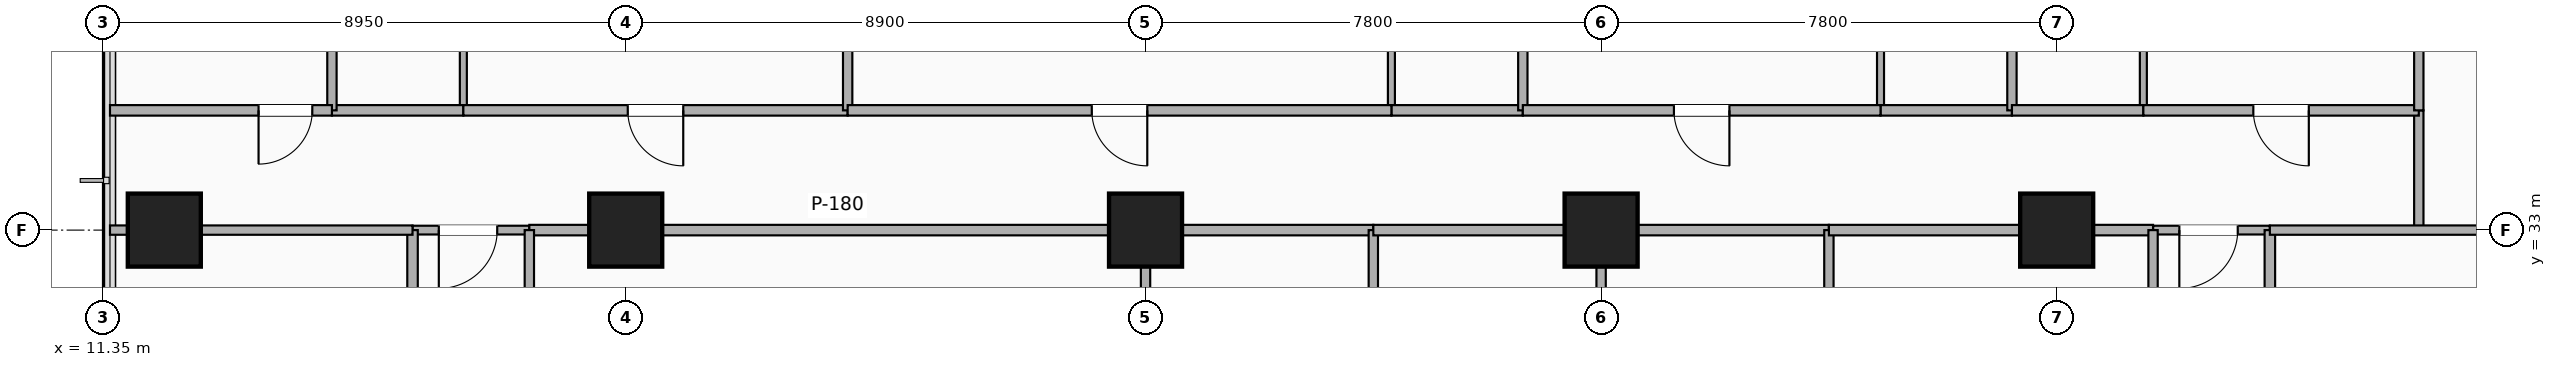
"""IFC4 building model, lengths in metres.
Left out: names, types, materials, properties, quantities, classifications, styles, units other than length and angle.
Written with IfcOpenShell. Run it as: python <this file> out.ifc"""

import sys

from ifc_helpers import new_model, si_unit, direction, frame, frame_2d, origin, origin_2d, place, context, subcontext, project, spatial, rectangle, extrude, element, fill, save


model = new_model("IFC4")
c1 = context("Model", 3, precision=1e-05, world=origin(), true_north=direction((0.0, 1.0)))
c2 = subcontext(c1, "Body", "Model", "MODEL_VIEW")
j1 = project(units=[si_unit("LENGTHUNIT", "METRE"), si_unit("PLANEANGLEUNIT", "RADIAN")], contexts=[c1])
p1 = place(None, origin())
s1 = spatial("IfcSite", under=j1, at=p1, CompositionType="ELEMENT")
p2 = place(p1, origin())
s2 = spatial("IfcBuilding", under=s1, at=p2, CompositionType="ELEMENT")
p3 = place(p2, frame((0.0, 0.0, 91.7)))
s3 = spatial("IfcBuildingStorey", under=s2, at=p3, CompositionType="ELEMENT", Elevation=91.7)
for number, where, z_axis, x_axis in (
    (1, (20.3, 33.0, -0.26), (0.0, 0.0, 1.0), (1.0, 0.0, 0.0)),
    (2, (29.2, 33.0, -0.26), (0.0, 0.0, 1.0), (1.0, 0.0, 0.0)),
    (3, (37.0, 33.0, -0.26), (0.0, 0.0, 1.0), (1.0, 0.0, 0.0)),
    (4, (44.8, 33.0, -0.26), (0.0, 0.0, 1.0), (1.0, 0.0, 0.0)),
    (5, (12.4, 33.0, -0.26), (0.0, 0.0, 1.0), (1.0, 0.0, 0.0)),
):
    element("IfcColumn", number, at=place(p3, frame(where, z_axis=z_axis, x_axis=x_axis)), inside=s3, PredefinedType="COLUMN", context=c2, shape_type="SweptSolid", body=[
        extrude(rectangle(XDim=1.25, YDim=1.25, at=origin_2d()), origin(), (0.0, 0.0, 1.0), 3.5),
    ])
p4 = place(p3, frame((16.65, 33.0, 0.0), z_axis=(0.0, 0.0, 1.0), x_axis=(1.0, 0.0, 0.0)))
e6 = element("IfcWall", 6, at=p4, inside=s3, PredefinedType="PARTITIONING", context=c2, shape_type="SweptSolid", body=[
    extrude(rectangle(XDim=2.0, YDim=0.15, at=frame_2d((1.0, 0.0))), origin(), (0.0, 0.0, 1.0), 2.313),
])
p5 = place(p4, frame((0.45, 0.0, 0.0)))
e7 = element("IfcOpeningElement", 7, at=p5, cuts=e6, PredefinedType="OPENING", context=c2, shape_type="SweptSolid", body=[
    extrude(rectangle(XDim=1.0, YDim=2.15, at=frame_2d((0.5, 1.075))), frame((0.0, 0.085, 0.0), z_axis=(0.0, -1.0, 0.0), x_axis=(1.0, 0.0, 0.0)), (0.0, 0.0, 1.0), 0.17),
])
p6 = place(p3, frame((46.45, 33.0, 0.0), z_axis=(0.0, 0.0, 1.0), x_axis=(1.0, 0.0, 0.0)))
e8 = element("IfcWall", 8, at=p6, inside=s3, PredefinedType="PARTITIONING", context=c2, shape_type="SweptSolid", body=[
    extrude(rectangle(XDim=2.0, YDim=0.15, at=frame_2d((1.0, 0.0))), origin(), (0.0, 0.0, 1.0), 2.313),
])
p7 = place(p6, frame((0.45, 0.0, 0.0)))
e9 = element("IfcOpeningElement", 9, at=p7, cuts=e8, PredefinedType="OPENING", context=c2, shape_type="SweptSolid", body=[
    extrude(rectangle(XDim=1.0, YDim=2.15, at=frame_2d((0.5, 1.075))), frame((0.0, 0.085, 0.0), z_axis=(0.0, -1.0, 0.0), x_axis=(1.0, 0.0, 0.0)), (0.0, 0.0, 1.0), 0.17),
])
p8 = place(p3, frame((51.0, 33.0, 0.0), z_axis=(0.0, 0.0, 1.0), x_axis=(0.0, 1.0, 0.0)))
e10 = element("IfcWall", 10, at=p8, inside=s3, PredefinedType="PARTITIONING", context=c2, shape_type="SweptSolid", body=[
    extrude(rectangle(XDim=2.05, YDim=0.16, at=frame_2d((1.025, 0.0))), origin(), (0.0, 0.0, 1.0), 2.313),
])
p9 = place(p3, frame((18.65, 33.0, 0.0), z_axis=(0.0, 0.0, 1.0), x_axis=(1.0, 0.0, 0.0)))
e11 = element("IfcWall", 11, at=p9, inside=s3, PredefinedType="PARTITIONING", context=c2, shape_type="SweptSolid", body=[
    extrude(rectangle(XDim=10.55, YDim=0.18, at=frame_2d((5.275, 0.0))), origin(), (0.0, 0.0, 1.0), 2.313),
])
for number, where, z_axis, x_axis in (
    (12, (18.65, 22.65, 0.0), (0.0, 0.0, 1.0), (0.0, 1.0, 0.0)),
    (13, (29.2, 22.65, 0.0), (0.0, 0.0, 1.0), (0.0, 1.0, 0.0)),
):
    element("IfcWall", number, at=place(p3, frame(where, z_axis=z_axis, x_axis=x_axis)), inside=s3, PredefinedType="PARTITIONING", context=c2, shape_type="SweptSolid", body=[
        extrude(rectangle(XDim=10.35, YDim=0.16, at=frame_2d((5.175, 0.0))), origin(), (0.0, 0.0, 1.0), 2.313),
    ])
p10 = place(p3, frame((29.2, 33.0, 0.0), z_axis=(0.0, 0.0, 1.0), x_axis=(1.0, 0.0, 0.0)))
e14 = element("IfcWall", 14, at=p10, inside=s3, PredefinedType="PARTITIONING", context=c2, shape_type="SweptSolid", body=[
    extrude(rectangle(XDim=3.9, YDim=0.18, at=frame_2d((1.95, 0.0))), origin(), (0.0, 0.0, 1.0), 2.313),
])
p11 = place(p3, frame((33.1, 22.65, 0.0), z_axis=(0.0, 0.0, 1.0), x_axis=(0.0, 1.0, 0.0)))
e15 = element("IfcWall", 15, at=p11, inside=s3, PredefinedType="PARTITIONING", context=c2, shape_type="SweptSolid", body=[
    extrude(rectangle(XDim=10.35, YDim=0.16, at=frame_2d((5.175, 0.0))), origin(), (0.0, 0.0, 1.0), 2.614),
])
p12 = place(p3, frame((33.1, 33.0, 0.0), z_axis=(0.0, 0.0, 1.0), x_axis=(1.0, 0.0, 0.0)))
e16 = element("IfcWall", 16, at=p12, inside=s3, PredefinedType="PARTITIONING", context=c2, shape_type="SweptSolid", body=[
    extrude(rectangle(XDim=3.9, YDim=0.18, at=frame_2d((1.95, 0.0))), origin(), (0.0, 0.0, 1.0), 2.313),
])
p13 = place(p3, frame((37.0, 22.65, 0.0), z_axis=(0.0, 0.0, 1.0), x_axis=(0.0, 1.0, 0.0)))
e17 = element("IfcWall", 17, at=p13, inside=s3, PredefinedType="PARTITIONING", context=c2, shape_type="SweptSolid", body=[
    extrude(rectangle(XDim=10.35, YDim=0.16, at=frame_2d((5.175, 0.0))), origin(), (0.0, 0.0, 1.0), 2.313),
])
p14 = place(p3, frame((37.0, 33.0, 0.0), z_axis=(0.0, 0.0, 1.0), x_axis=(1.0, 0.0, 0.0)))
e18 = element("IfcWall", 18, at=p14, inside=s3, PredefinedType="PARTITIONING", context=c2, shape_type="SweptSolid", body=[
    extrude(rectangle(XDim=3.9, YDim=0.18, at=frame_2d((1.95, 0.0))), origin(), (0.0, 0.0, 1.0), 2.313),
])
p15 = place(p3, frame((40.9, 22.65, 0.0), z_axis=(0.0, 0.0, 1.0), x_axis=(0.0, 1.0, 0.0)))
e19 = element("IfcWall", 19, at=p15, inside=s3, PredefinedType="PARTITIONING", context=c2, shape_type="SweptSolid", body=[
    extrude(rectangle(XDim=10.35, YDim=0.16, at=frame_2d((5.175, 0.0))), origin(), (0.0, 0.0, 1.0), 2.614),
])
p16 = place(p3, frame((40.9, 33.0, 0.0), z_axis=(0.0, 0.0, 1.0), x_axis=(1.0, 0.0, 0.0)))
e20 = element("IfcWall", 20, at=p16, inside=s3, PredefinedType="PARTITIONING", context=c2, shape_type="SweptSolid", body=[
    extrude(rectangle(XDim=5.55, YDim=0.18, at=frame_2d((2.775, 0.0))), origin(), (0.0, 0.0, 1.0), 2.313),
])
p17 = place(p3, frame((46.45, 22.65, 0.0), z_axis=(0.0, 0.0, 1.0), x_axis=(0.0, 1.0, 0.0)))
e21 = element("IfcWall", 21, at=p17, inside=s3, PredefinedType="PARTITIONING", context=c2, shape_type="SweptSolid", body=[
    extrude(rectangle(XDim=10.35, YDim=0.16, at=frame_2d((5.175, 0.0))), origin(), (0.0, 0.0, 1.0), 2.313),
])
p18 = place(p3, frame((17.52, 35.05, 0.0), z_axis=(0.0, 0.0, 1.0), x_axis=(0.0, 1.0, 0.0)))
e22 = element("IfcWall", 22, at=p18, inside=s3, PredefinedType="PARTITIONING", context=c2, shape_type="SweptSolid", body=[
    extrude(rectangle(XDim=2.35, YDim=0.12, at=frame_2d((1.175, 0.0))), origin(), (0.0, 0.0, 1.0), 3.24),
])
p19 = place(p3, frame((15.27, 35.05, 0.0), z_axis=(0.0, 0.0, 1.0), x_axis=(1.0, 0.0, 0.0)))
e23 = element("IfcWall", 23, at=p19, inside=s3, PredefinedType="PARTITIONING", context=c2, shape_type="SweptSolid", body=[
    extrude(rectangle(XDim=2.25, YDim=0.18, at=frame_2d((1.125, 0.0))), origin(), (0.0, 0.0, 1.0), 3.24),
])
p20 = place(p3, frame((17.52, 35.05, 0.0), z_axis=(0.0, 0.0, 1.0), x_axis=(1.0, 0.0, 0.0)))
e24 = element("IfcWall", 24, at=p20, inside=s3, PredefinedType="PARTITIONING", context=c2, shape_type="SweptSolid", body=[
    extrude(rectangle(XDim=6.58, YDim=0.18, at=frame_2d((3.29, 0.0))), origin(), (0.0, 0.0, 1.0), 2.313),
])
p21 = place(p20, frame((2.815, 0.0, 0.0)))
e25 = element("IfcOpeningElement", 25, at=p21, cuts=e24, PredefinedType="OPENING", context=c2, shape_type="SweptSolid", body=[
    extrude(rectangle(XDim=0.95, YDim=2.15, at=frame_2d((0.475, 1.075))), frame((0.0, 0.1, 0.0), z_axis=(0.0, -1.0, 0.0), x_axis=(1.0, 0.0, 0.0)), (0.0, 0.0, 1.0), 0.2),
])
p22 = place(p3, frame((15.27, 35.05, 0.0), z_axis=(0.0, 0.0, 1.0), x_axis=(0.0, 1.0, 0.0)))
e26 = element("IfcWall", 26, at=p22, inside=s3, PredefinedType="PARTITIONING", context=c2, shape_type="SweptSolid", body=[
    extrude(rectangle(XDim=7.53, YDim=0.16, at=frame_2d((3.765, 0.0))), origin(), (0.0, 0.0, 1.0), 3.24),
])
p23 = place(p3, frame((24.1, 35.05, 0.0), z_axis=(0.0, 0.0, 1.0), x_axis=(0.0, 1.0, 0.0)))
e27 = element("IfcWall", 27, at=p23, inside=s3, PredefinedType="PARTITIONING", context=c2, shape_type="SweptSolid", body=[
    extrude(rectangle(XDim=11.33, YDim=0.16, at=frame_2d((5.665, 0.0))), origin(), (0.0, 0.0, 1.0), 2.603),
])
p24 = place(p3, frame((33.41, 35.05, 0.0), z_axis=(0.0, 0.0, 1.0), x_axis=(0.0, 1.0, 0.0)))
e28 = element("IfcWall", 28, at=p24, inside=s3, PredefinedType="PARTITIONING", context=c2, shape_type="SweptSolid", body=[
    extrude(rectangle(XDim=2.35, YDim=0.12, at=frame_2d((1.175, 0.0))), origin(), (0.0, 0.0, 1.0), 2.922),
])
p25 = place(p3, frame((33.41, 35.05, 0.0), z_axis=(0.0, 0.0, 1.0), x_axis=(1.0, 0.0, 0.0)))
e29 = element("IfcWall", 29, at=p25, inside=s3, PredefinedType="PARTITIONING", context=c2, shape_type="SweptSolid", body=[
    extrude(rectangle(XDim=2.25, YDim=0.18, at=frame_2d((1.125, 0.0))), origin(), (0.0, 0.0, 1.0), 3.24),
])
p26 = place(p3, frame((24.1, 35.05, 0.0), z_axis=(0.0, 0.0, 1.0), x_axis=(1.0, 0.0, 0.0)))
e30 = element("IfcWall", 30, at=p26, inside=s3, PredefinedType="PARTITIONING", context=c2, shape_type="SweptSolid", body=[
    extrude(rectangle(XDim=9.31, YDim=0.18, at=frame_2d((4.655, 0.0))), origin(), (0.0, 0.0, 1.0), 2.313),
])
p27 = place(p26, frame((4.18, 0.0, 0.0)))
e31 = element("IfcOpeningElement", 31, at=p27, cuts=e30, PredefinedType="OPENING", context=c2, shape_type="SweptSolid", body=[
    extrude(rectangle(XDim=0.95, YDim=2.15, at=frame_2d((0.475, 1.075))), frame((0.0, 0.1, 0.0), z_axis=(0.0, -1.0, 0.0), x_axis=(1.0, 0.0, 0.0)), (0.0, 0.0, 1.0), 0.2),
])
p28 = place(p3, frame((35.66, 35.05, 0.0), z_axis=(0.0, 0.0, 1.0), x_axis=(0.0, 1.0, 0.0)))
e32 = element("IfcWall", 32, at=p28, inside=s3, PredefinedType="PARTITIONING", context=c2, shape_type="SweptSolid", body=[
    extrude(rectangle(XDim=11.33, YDim=0.16, at=frame_2d((5.665, 0.0))), origin(), (0.0, 0.0, 1.0), 2.603),
])
p29 = place(p3, frame((41.784, 35.05, 0.0), z_axis=(0.0, 0.0, 1.0), x_axis=(0.0, 1.0, 0.0)))
e33 = element("IfcWall", 33, at=p29, inside=s3, PredefinedType="PARTITIONING", context=c2, shape_type="SweptSolid", body=[
    extrude(rectangle(XDim=2.35, YDim=0.12, at=frame_2d((1.175, 0.0))), origin(), (0.0, 0.0, 1.0), 2.922),
])
p30 = place(p3, frame((41.784, 35.05, 0.0), z_axis=(0.0, 0.0, 1.0), x_axis=(1.0, 0.0, 0.0)))
e34 = element("IfcWall", 34, at=p30, inside=s3, PredefinedType="PARTITIONING", context=c2, shape_type="SweptSolid", body=[
    extrude(rectangle(XDim=2.25, YDim=0.18, at=frame_2d((1.125, 0.0))), origin(), (0.0, 0.0, 1.0), 3.24),
])
p31 = place(p3, frame((35.66, 35.05, 0.0), z_axis=(0.0, 0.0, 1.0), x_axis=(1.0, 0.0, 0.0)))
e35 = element("IfcWall", 35, at=p31, inside=s3, PredefinedType="PARTITIONING", context=c2, shape_type="SweptSolid", body=[
    extrude(rectangle(XDim=6.124, YDim=0.18, at=frame_2d((3.062, 0.0))), origin(), (0.0, 0.0, 1.0), 2.313),
])
p32 = place(p31, frame((2.587, 0.0, 0.0)))
e36 = element("IfcOpeningElement", 36, at=p32, cuts=e35, PredefinedType="OPENING", context=c2, shape_type="SweptSolid", body=[
    extrude(rectangle(XDim=0.95, YDim=2.15, at=frame_2d((0.475, 1.075))), frame((0.0, 0.1, 0.0), z_axis=(0.0, -1.0, 0.0), x_axis=(1.0, 0.0, 0.0)), (0.0, 0.0, 1.0), 0.2),
])
p33 = place(p3, frame((44.034, 35.05, 0.0), z_axis=(0.0, 0.0, 1.0), x_axis=(0.0, 1.0, 0.0)))
e37 = element("IfcWall", 37, at=p33, inside=s3, PredefinedType="PARTITIONING", context=c2, shape_type="SweptSolid", body=[
    extrude(rectangle(XDim=11.33, YDim=0.16, at=frame_2d((5.665, 0.0))), origin(), (0.0, 0.0, 1.0), 2.603),
])
p34 = place(p3, frame((46.284, 35.05, 0.0), z_axis=(0.0, 0.0, 1.0), x_axis=(0.0, 1.0, 0.0)))
e38 = element("IfcWall", 38, at=p34, inside=s3, PredefinedType="PARTITIONING", context=c2, shape_type="SweptSolid", body=[
    extrude(rectangle(XDim=2.35, YDim=0.12, at=frame_2d((1.175, 0.0))), origin(), (0.0, 0.0, 1.0), 3.24),
])
p35 = place(p3, frame((44.034, 35.05, 0.0), z_axis=(0.0, 0.0, 1.0), x_axis=(1.0, 0.0, 0.0)))
e39 = element("IfcWall", 39, at=p35, inside=s3, PredefinedType="PARTITIONING", context=c2, shape_type="SweptSolid", body=[
    extrude(rectangle(XDim=2.25, YDim=0.18, at=frame_2d((1.125, 0.0))), origin(), (0.0, 0.0, 1.0), 2.313),
])
p36 = place(p3, frame((46.284, 35.05, 0.0), z_axis=(0.0, 0.0, 1.0), x_axis=(1.0, 0.0, 0.0)))
e40 = element("IfcWall", 40, at=p36, inside=s3, PredefinedType="PARTITIONING", context=c2, shape_type="SweptSolid", body=[
    extrude(rectangle(XDim=4.716, YDim=0.18, at=frame_2d((2.358, 0.0))), origin(), (0.0, 0.0, 1.0), 3.24),
])
p37 = place(p36, frame((1.883, 0.0, 0.0)))
e41 = element("IfcOpeningElement", 41, at=p37, cuts=e40, PredefinedType="OPENING", context=c2, shape_type="SweptSolid", body=[
    extrude(rectangle(XDim=0.95, YDim=2.15, at=frame_2d((0.475, 1.075))), frame((0.0, 0.1, 0.0), z_axis=(0.0, -1.0, 0.0), x_axis=(1.0, 0.0, 0.0)), (0.0, 0.0, 1.0), 0.2),
])
p38 = place(p3, frame((51.0, 35.05, 0.0), z_axis=(0.0, 0.0, 1.0), x_axis=(0.0, 1.0, 0.0)))
e42 = element("IfcWall", 42, at=p38, inside=s3, PredefinedType="PARTITIONING", context=c2, shape_type="SweptSolid", body=[
    extrude(rectangle(XDim=11.33, YDim=0.16, at=frame_2d((5.665, 0.0))), origin(), (0.0, 0.0, 1.0), 3.24),
])
p39 = place(p3, frame((16.65, 29.22, 0.0), z_axis=(0.0, 0.0, 1.0), x_axis=(0.0, 1.0, 0.0)))
e43 = element("IfcWall", 43, at=p39, inside=s3, PredefinedType="PARTITIONING", context=c2, shape_type="SweptSolid", body=[
    extrude(rectangle(XDim=3.78, YDim=0.18, at=frame_2d((1.89, 0.0))), origin(), (0.0, 0.0, 1.0), 2.313),
])
p40 = place(p39, frame((1.415, 0.0, 0.0)))
e44 = element("IfcOpeningElement", 44, at=p40, cuts=e43, PredefinedType="OPENING", context=c2, shape_type="SweptSolid", body=[
    extrude(rectangle(XDim=0.95, YDim=2.15, at=frame_2d((0.475, 1.075))), frame((0.0, 0.1, 0.0), z_axis=(0.0, -1.0, 0.0), x_axis=(1.0, 0.0, 0.0)), (0.0, 0.0, 1.0), 0.2),
])
p41 = place(p3, frame((11.47, 33.0, 0.0), z_axis=(0.0, 0.0, 1.0), x_axis=(1.0, 0.0, 0.0)))
e45 = element("IfcWall", 45, at=p41, inside=s3, PredefinedType="PARTITIONING", context=c2, shape_type="SweptSolid", body=[
    extrude(rectangle(XDim=5.18, YDim=0.16, at=frame_2d((2.59, 0.0))), origin(), (0.0, 0.0, 1.0), 2.313),
])
p42 = place(p3, frame((48.45, 25.55, 0.0), z_axis=(0.0, 0.0, 1.0), x_axis=(0.0, 1.0, 0.0)))
e46 = element("IfcWall", 46, at=p42, inside=s3, PredefinedType="PARTITIONING", context=c2, shape_type="SweptSolid", body=[
    extrude(rectangle(XDim=7.45, YDim=0.18, at=frame_2d((3.725, 0.0))), origin(), (0.0, 0.0, 1.0), 2.313),
])
p43 = place(p42, frame((4.2, 0.0, 0.0), z_axis=(0.0, 0.0, 1.0), x_axis=(-1.0, 0.0, 0.0)))
e47 = element("IfcOpeningElement", 47, at=p43, cuts=e46, PredefinedType="OPENING", context=c2, shape_type="SweptSolid", body=[
    extrude(rectangle(XDim=0.95, YDim=2.15, at=frame_2d((0.475, 1.075))), frame((0.0, 0.1, 0.0), z_axis=(0.0, -1.0, 0.0), x_axis=(1.0, 0.0, 0.0)), (0.0, 0.0, 1.0), 0.2),
])
p44 = place(p3, frame((48.45, 33.0, 0.0), z_axis=(0.0, 0.0, 1.0), x_axis=(1.0, 0.0, 0.0)))
e48 = element("IfcWall", 48, at=p44, inside=s3, PredefinedType="PARTITIONING", context=c2, shape_type="SweptSolid", body=[
    extrude(rectangle(XDim=10.43, YDim=0.16, at=frame_2d((5.215, 0.0))), origin(), (0.0, 0.0, 1.0), 2.313),
])
p45 = place(p3, frame((11.47, 35.05, 0.0), z_axis=(0.0, 0.0, 1.0), x_axis=(1.0, 0.0, 0.0)))
e49 = element("IfcWall", 49, at=p45, inside=s3, PredefinedType="PARTITIONING", context=c2, shape_type="SweptSolid", body=[
    extrude(rectangle(XDim=3.8, YDim=0.18, at=frame_2d((1.9, 0.0))), origin(), (0.0, 0.0, 1.0), 3.24),
])
p46 = place(p45, frame((2.544, 0.0, 0.0)))
e50 = element("IfcOpeningElement", 50, at=p46, cuts=e49, PredefinedType="OPENING", context=c2, shape_type="SweptSolid", body=[
    extrude(rectangle(XDim=0.92, YDim=2.08, at=frame_2d((0.46, 1.04))), frame((0.0, 0.1, 0.0), z_axis=(0.0, -1.0, 0.0), x_axis=(1.0, 0.0, 0.0)), (0.0, 0.0, 1.0), 0.2),
])
p47 = place(p5, origin())
e51 = element("IfcDoor", 51, at=p47, inside=s3, OperationType="SINGLE_SWING_LEFT", PredefinedType="DOOR", context=c2, shape_type="SweptSolid", body=[
    extrude(rectangle(XDim=1.0, YDim=2.15, at=frame_2d((0.5, 1.075))), frame((0.0, 0.025, 0.0), z_axis=(0.0, -1.0, 0.0), x_axis=(1.0, 0.0, 0.0)), (0.0, 0.0, 1.0), 0.05),
])
fill(e7, e51)
p48 = place(p7, origin())
e52 = element("IfcDoor", 52, at=p48, inside=s3, OperationType="SINGLE_SWING_LEFT", PredefinedType="DOOR", context=c2, shape_type="SweptSolid", body=[
    extrude(rectangle(XDim=1.0, YDim=2.15, at=frame_2d((0.5, 1.075))), frame((0.0, 0.025, 0.0), z_axis=(0.0, -1.0, 0.0), x_axis=(1.0, 0.0, 0.0)), (0.0, 0.0, 1.0), 0.05),
])
fill(e9, e52)
p49 = place(p21, origin())
e53 = element("IfcDoor", 53, at=p49, inside=s3, OperationType="SINGLE_SWING_RIGHT", PredefinedType="DOOR", context=c2, shape_type="SweptSolid", body=[
    extrude(rectangle(XDim=0.95, YDim=2.15, at=frame_2d((0.475, 1.075))), frame((0.0, 0.025, 0.0), z_axis=(0.0, -1.0, 0.0), x_axis=(1.0, 0.0, 0.0)), (0.0, 0.0, 1.0), 0.05),
])
fill(e25, e53)
p50 = place(p27, origin())
e54 = element("IfcDoor", 54, at=p50, inside=s3, OperationType="SINGLE_SWING_RIGHT", PredefinedType="DOOR", context=c2, shape_type="SweptSolid", body=[
    extrude(rectangle(XDim=0.95, YDim=2.15, at=frame_2d((0.475, 1.075))), frame((0.0, 0.025, 0.0), z_axis=(0.0, -1.0, 0.0), x_axis=(1.0, 0.0, 0.0)), (0.0, 0.0, 1.0), 0.05),
])
fill(e31, e54)
p51 = place(p32, origin())
e55 = element("IfcDoor", 55, at=p51, inside=s3, OperationType="SINGLE_SWING_RIGHT", PredefinedType="DOOR", context=c2, shape_type="SweptSolid", body=[
    extrude(rectangle(XDim=0.95, YDim=2.15, at=frame_2d((0.475, 1.075))), frame((0.0, 0.025, 0.0), z_axis=(0.0, -1.0, 0.0), x_axis=(1.0, 0.0, 0.0)), (0.0, 0.0, 1.0), 0.05),
])
fill(e36, e55)
p52 = place(p37, origin())
e56 = element("IfcDoor", 56, at=p52, inside=s3, OperationType="SINGLE_SWING_RIGHT", PredefinedType="DOOR", context=c2, shape_type="SweptSolid", body=[
    extrude(rectangle(XDim=0.95, YDim=2.15, at=frame_2d((0.475, 1.075))), frame((0.0, 0.025, 0.0), z_axis=(0.0, -1.0, 0.0), x_axis=(1.0, 0.0, 0.0)), (0.0, 0.0, 1.0), 0.05),
])
fill(e41, e56)
p53 = place(p46, origin())
e57 = element("IfcDoor", 57, at=p53, inside=s3, OperationType="SINGLE_SWING_LEFT", PredefinedType="DOOR", context=c2, shape_type="SweptSolid", body=[
    extrude(rectangle(XDim=0.92, YDim=2.08, at=frame_2d((0.46, 1.04))), frame((0.0, 0.025, 0.0), z_axis=(0.0, -1.0, 0.0), x_axis=(1.0, 0.0, 0.0)), (0.0, 0.0, 1.0), 0.05),
])
fill(e50, e57)
save(model, sys.argv[1])
